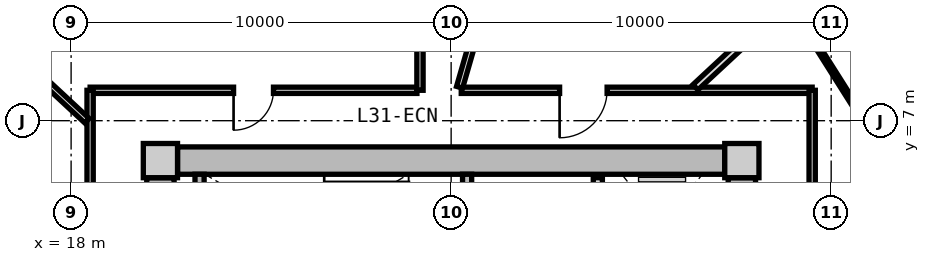
"""IFC4 building model, lengths in metres.
Left out: names, types, materials, properties, quantities, classifications, styles, units other than length and angle.
Written with IfcOpenShell. Run it as: python <this file> out.ifc"""

import sys

from ifc_helpers import new_model, si_unit, direction, frame, frame_2d, origin, origin_2d, place, context, subcontext, project, spatial, rectangle, extrude, source, transform, mapped, element, fill, save


model = new_model("IFC4")
c1 = context("Model", 3, precision=1e-05, world=origin(), true_north=direction((0.0, 1.0)))
c2 = subcontext(c1, "Body", "Model", "MODEL_VIEW")
j1 = project(units=[si_unit("LENGTHUNIT", "METRE"), si_unit("PLANEANGLEUNIT", "RADIAN")], contexts=[c1])
p1 = place(None, origin())
s1 = spatial("IfcSite", under=j1, at=p1, CompositionType="ELEMENT")
p2 = place(p1, origin())
s2 = spatial("IfcBuilding", under=s1, at=p2, CompositionType="ELEMENT")
p3 = place(p2, frame((0.0, 0.0, 102.35)))
s3 = spatial("IfcBuildingStorey", under=s2, at=p3, CompositionType="ELEMENT", Elevation=102.35)
m1 = source(origin(), c2, "Body", "SweptSolid", [
    extrude(rectangle(XDim=0.9, YDim=0.9, at=origin_2d()), origin(), (0.0, 0.0, 1.0), 3.05),
])
for number, where, z_axis, x_axis in (
    (1, (35.65, 5.95, 0.0), (0.0, 0.0, 1.0), (1.0, 0.0, 0.0)),
    (2, (20.35, 5.95, 0.0), (0.0, 0.0, 1.0), (1.0, 0.0, 0.0)),
):
    element("IfcColumn", number, at=place(p3, frame(where, z_axis=z_axis, x_axis=x_axis)), inside=s3, PredefinedType="COLUMN", context=c2, shape_type="MappedRepresentation", body=[
        mapped(m1, transform((0.0, 0.0, 0.0), x_axis=(1.0, 0.0, 0.0), y_axis=(0.0, 1.0, 0.0), z_axis=(0.0, 0.0, 1.0), scale=1.0)),
    ])
m2 = source(origin(), c2, "Body", "SweptSolid", [
    extrude(rectangle(XDim=14.4, YDim=0.72, at=frame_2d((7.2, 0.0))), origin(), (0.0, 0.0, 1.0), 2.79),
])
p4 = place(p3, frame((20.8, 5.95, 0.0), z_axis=(0.0, 0.0, 1.0), x_axis=(1.0, 0.0, 0.0)))
e3 = element("IfcWall", 3, at=p4, inside=s3, PredefinedType="SHEAR", context=c2, shape_type="MappedRepresentation", body=[
    mapped(m2, transform((0.0, 0.0, 0.0), x_axis=(1.0, 0.0, 0.0), y_axis=(0.0, 1.0, 0.0), z_axis=(0.0, 0.0, 1.0), scale=1.0)),
])
m3 = source(origin(), c2, "Body", "SweptSolid", [
    extrude(rectangle(XDim=11.0, YDim=0.72, at=frame_2d((5.5, 0.0))), origin(), (0.0, 0.0, 1.0), 2.79),
])
p5 = place(p3, frame((20.35, -5.5, 0.0), z_axis=(0.0, 0.0, 1.0), x_axis=(0.0, 1.0, 0.0)))
e4 = element("IfcWall", 4, at=p5, inside=s3, PredefinedType="SHEAR", context=c2, shape_type="MappedRepresentation", body=[
    mapped(m3, transform((0.0, 0.0, 0.0), x_axis=(1.0, 0.0, 0.0), y_axis=(0.0, 1.0, 0.0), z_axis=(0.0, 0.0, 1.0), scale=1.0)),
])
p6 = place(p5, frame((3.8, 0.0, 0.0)))
e5 = element("IfcOpeningElement", 5, at=p6, cuts=e4, PredefinedType="OPENING", context=c2, shape_type="SweptSolid", body=[
    extrude(rectangle(XDim=1.2, YDim=2.15, at=frame_2d((0.6, 1.075))), frame((0.0, 0.37, 0.0), z_axis=(0.0, -1.0, 0.0), x_axis=(1.0, 0.0, 0.0)), (0.0, 0.0, 1.0), 0.74),
])
p7 = place(p3, frame((35.65, 5.5, 0.0), z_axis=(0.0, 0.0, 1.0), x_axis=(0.0, -1.0, 0.0)))
e6 = element("IfcWall", 6, at=p7, inside=s3, PredefinedType="SHEAR", context=c2, shape_type="MappedRepresentation", body=[
    mapped(m3, transform((0.0, 0.0, 0.0), x_axis=(1.0, 0.0, 0.0), y_axis=(0.0, 1.0, 0.0), z_axis=(0.0, 0.0, 1.0), scale=1.0)),
])
p8 = place(p7, frame((5.65, 0.0, 0.0)))
e7 = element("IfcOpeningElement", 7, at=p8, cuts=e6, PredefinedType="OPENING", context=c2, shape_type="SweptSolid", body=[
    extrude(rectangle(XDim=1.2, YDim=2.15, at=frame_2d((0.6, 1.075))), frame((0.0, 0.37, 0.0), z_axis=(0.0, -1.0, 0.0), x_axis=(1.0, 0.0, 0.0)), (0.0, 0.0, 1.0), 0.74),
])
m4 = source(origin(), c2, "Body", "SweptSolid", [
    extrude(rectangle(XDim=3.14, YDim=0.24, at=frame_2d((1.57, 0.0))), origin(), (0.0, 0.0, 1.0), 2.79),
])
p9 = place(p3, frame((21.38, 2.45, 0.0), z_axis=(0.0, 0.0, 1.0), x_axis=(0.0, 1.0, 0.0)))
e8 = element("IfcWall", 8, at=p9, inside=s3, PredefinedType="PARTITIONING", context=c2, shape_type="MappedRepresentation", body=[
    mapped(m4, transform((0.0, 0.0, 0.0), x_axis=(1.0, 0.0, 0.0), y_axis=(0.0, 1.0, 0.0), z_axis=(0.0, 0.0, 1.0), scale=1.0)),
])
p10 = place(p3, frame((28.42, 2.45, 0.0), z_axis=(0.0, 0.0, 1.0), x_axis=(0.0, 1.0, 0.0)))
e9 = element("IfcWall", 9, at=p10, inside=s3, PredefinedType="PARTITIONING", context=c2, shape_type="MappedRepresentation", body=[
    mapped(m4, transform((0.0, 0.0, 0.0), x_axis=(1.0, 0.0, 0.0), y_axis=(0.0, 1.0, 0.0), z_axis=(0.0, 0.0, 1.0), scale=1.0)),
])
p11 = place(p10, frame((0.55, 0.0, 0.0)))
e10 = element("IfcOpeningElement", 10, at=p11, cuts=e9, PredefinedType="OPENING", context=c2, shape_type="SweptSolid", body=[
    extrude(rectangle(XDim=1.1, YDim=2.15, at=frame_2d((0.55, 1.075))), frame((0.0, 0.13, 0.0), z_axis=(0.0, -1.0, 0.0), x_axis=(1.0, 0.0, 0.0)), (0.0, 0.0, 1.0), 0.26),
])
m5 = source(origin(), c2, "Body", "SweptSolid", [
    extrude(rectangle(XDim=5.0, YDim=0.24, at=frame_2d((2.5, 0.0))), origin(), (0.0, 0.0, 1.0), 2.775),
])
p12 = place(p3, frame((31.86, 0.5, 0.0), z_axis=(0.0, 0.0, 1.0), x_axis=(0.0, 1.0, 0.0)))
e11 = element("IfcWall", 11, at=p12, inside=s3, PredefinedType="PARTITIONING", context=c2, shape_type="MappedRepresentation", body=[
    mapped(m5, transform((0.0, 0.0, 0.0), x_axis=(1.0, 0.0, 0.0), y_axis=(0.0, 1.0, 0.0), z_axis=(0.0, 0.0, 1.0), scale=1.0)),
])
p13 = place(p12, frame((3.05, 0.0, 0.0)))
e12 = element("IfcOpeningElement", 12, at=p13, cuts=e11, PredefinedType="OPENING", context=c2, shape_type="SweptSolid", body=[
    extrude(rectangle(XDim=1.3, YDim=2.2, at=frame_2d((0.65, 1.1))), frame((0.0, 0.13, 0.0), z_axis=(0.0, -1.0, 0.0), x_axis=(1.0, 0.0, 0.0)), (0.0, 0.0, 1.0), 0.26),
])
p14 = place(p12, frame((0.55, 0.0, 0.0)))
e13 = element("IfcOpeningElement", 13, at=p14, cuts=e11, PredefinedType="OPENING", context=c2, shape_type="SweptSolid", body=[
    extrude(rectangle(XDim=1.3, YDim=2.2, at=frame_2d((0.65, 1.1))), frame((0.0, 0.13, 0.0), z_axis=(0.0, -1.0, 0.0), x_axis=(1.0, 0.0, 0.0)), (0.0, 0.0, 1.0), 0.26),
])
m6 = source(origin(), c2, "Body", "SweptSolid", [
    extrude(rectangle(XDim=8.6, YDim=0.165, at=frame_2d((4.3, 0.0))), origin(), (0.0, 0.0, 1.0), 2.775),
])
p15 = place(p3, frame((18.5, 7.8, 0.0), z_axis=(0.0, 0.0, 1.0), x_axis=(1.0, 0.0, 0.0)))
e14 = element("IfcWall", 14, at=p15, inside=s3, PredefinedType="PARTITIONING", context=c2, shape_type="MappedRepresentation", body=[
    mapped(m6, transform((0.0, 0.0, 0.0), x_axis=(1.0, 0.0, 0.0), y_axis=(0.0, 1.0, 0.0), z_axis=(0.0, 0.0, 1.0), scale=1.0)),
])
p16 = place(p15, frame((3.775, 0.0, 0.0)))
e15 = element("IfcOpeningElement", 15, at=p16, cuts=e14, PredefinedType="OPENING", context=c2, shape_type="SweptSolid", body=[
    extrude(rectangle(XDim=1.05, YDim=2.15, at=frame_2d((0.525, 1.075))), frame((0.0, 0.093, 0.0), z_axis=(0.0, -1.0, 0.0), x_axis=(1.0, 0.0, 0.0)), (0.0, 0.0, 1.0), 0.185),
])
m7 = source(origin(), c2, "Body", "SweptSolid", [
    extrude(rectangle(XDim=9.234, YDim=0.165, at=frame_2d((4.617, 0.0))), origin(), (0.0, 0.0, 1.0), 2.775),
])
p17 = place(p3, frame((28.266, 7.8, 0.0), z_axis=(0.0, 0.0, 1.0), x_axis=(1.0, 0.0, 0.0)))
e16 = element("IfcWall", 16, at=p17, inside=s3, PredefinedType="PARTITIONING", context=c2, shape_type="MappedRepresentation", body=[
    mapped(m7, transform((0.0, 0.0, 0.0), x_axis=(1.0, 0.0, 0.0), y_axis=(0.0, 1.0, 0.0), z_axis=(0.0, 0.0, 1.0), scale=1.0)),
])
p18 = place(p17, frame((2.588, 0.0, 0.0)))
e17 = element("IfcOpeningElement", 17, at=p18, cuts=e16, PredefinedType="OPENING", context=c2, shape_type="SweptSolid", body=[
    extrude(rectangle(XDim=1.25, YDim=2.2, at=frame_2d((0.625, 1.1))), frame((0.0, 0.093, 0.0), z_axis=(0.0, -1.0, 0.0), x_axis=(1.0, 0.0, 0.0)), (0.0, 0.0, 1.0), 0.185),
])
m8 = source(origin(), c2, "Body", "SweptSolid", [
    extrude(rectangle(XDim=15.6, YDim=0.165, at=frame_2d((7.8, 0.0))), origin(), (0.0, 0.0, 1.0), 2.775),
])
p19 = place(p3, frame((18.5, -7.8, 0.0), z_axis=(0.0, 0.0, 1.0), x_axis=(0.0, 1.0, 0.0)))
e18 = element("IfcWall", 18, at=p19, inside=s3, PredefinedType="PARTITIONING", context=c2, shape_type="MappedRepresentation", body=[
    mapped(m8, transform((0.0, 0.0, 0.0), x_axis=(1.0, 0.0, 0.0), y_axis=(0.0, 1.0, 0.0), z_axis=(0.0, 0.0, 1.0), scale=1.0)),
])
p20 = place(p19, frame((10.383, 0.0, 0.0)))
e19 = element("IfcOpeningElement", 19, at=p20, cuts=e18, PredefinedType="OPENING", context=c2, shape_type="SweptSolid", body=[
    extrude(rectangle(XDim=1.05, YDim=2.15, at=frame_2d((0.525, 1.075))), frame((0.0, 0.093, 0.0), z_axis=(0.0, -1.0, 0.0), x_axis=(1.0, 0.0, 0.0)), (0.0, 0.0, 1.0), 0.185),
])
p21 = place(p19, frame((6.419, 0.0, 0.0)))
e20 = element("IfcOpeningElement", 20, at=p21, cuts=e18, PredefinedType="OPENING", context=c2, shape_type="SweptSolid", body=[
    extrude(rectangle(XDim=1.05, YDim=2.15, at=frame_2d((0.525, 1.075))), frame((0.0, 0.093, 0.0), z_axis=(0.0, -1.0, 0.0), x_axis=(1.0, 0.0, 0.0)), (0.0, 0.0, 1.0), 0.185),
])
p22 = place(p19, frame((1.821, 0.0, 0.0)))
e21 = element("IfcOpeningElement", 21, at=p22, cuts=e18, PredefinedType="OPENING", context=c2, shape_type="SweptSolid", body=[
    extrude(rectangle(XDim=1.05, YDim=2.15, at=frame_2d((0.525, 1.075))), frame((0.0, 0.093, 0.0), z_axis=(0.0, -1.0, 0.0), x_axis=(1.0, 0.0, 0.0)), (0.0, 0.0, 1.0), 0.185),
])
p23 = place(p3, frame((37.5, 7.8, 0.0), z_axis=(0.0, 0.0, 1.0), x_axis=(0.0, -1.0, 0.0)))
e22 = element("IfcWall", 22, at=p23, inside=s3, PredefinedType="PARTITIONING", context=c2, shape_type="MappedRepresentation", body=[
    mapped(m8, transform((0.0, 0.0, 0.0), x_axis=(1.0, 0.0, 0.0), y_axis=(0.0, 1.0, 0.0), z_axis=(0.0, 0.0, 1.0), scale=1.0)),
])
p24 = place(p23, frame((6.87, 0.0, 0.0)))
e23 = element("IfcOpeningElement", 23, at=p24, cuts=e22, PredefinedType="OPENING", context=c2, shape_type="SweptSolid", body=[
    extrude(rectangle(XDim=1.05, YDim=2.15, at=frame_2d((0.525, 1.075))), frame((0.0, 0.093, 0.0), z_axis=(0.0, -1.0, 0.0), x_axis=(1.0, 0.0, 0.0)), (0.0, 0.0, 1.0), 0.185),
])
m9 = source(origin(), c2, "Body", "SweptSolid", [
    extrude(rectangle(XDim=8.989, YDim=0.165, at=frame_2d((4.495, 0.0))), origin(), (0.0, 0.0, 1.0), 2.275),
])
p25 = place(p3, frame((28.222, 7.88, 0.0), z_axis=(0.0, 0.0, 1.0), x_axis=(0.27702323008, 0.960863221274, 0.0)))
e24 = element("IfcWall", 24, at=p25, inside=s3, PredefinedType="PARTITIONING", context=c2, shape_type="MappedRepresentation", body=[
    mapped(m9, transform((0.0, 0.0, 0.0), x_axis=(1.0, 0.0, 0.0), y_axis=(0.0, 1.0, 0.0), z_axis=(0.0, 0.0, 1.0), scale=1.0)),
])
m10 = source(origin(), c2, "Body", "SweptSolid", [
    extrude(rectangle(XDim=7.482, YDim=0.165, at=frame_2d((3.741, 0.0))), origin(), (0.0, 0.0, 1.0), 2.275),
])
p26 = place(p3, frame((18.42, 6.998, 0.0), z_axis=(0.0, 0.0, 1.0), x_axis=(-0.732508698043, 0.680757671489, 0.0)))
e25 = element("IfcWall", 25, at=p26, inside=s3, PredefinedType="PARTITIONING", context=c2, shape_type="MappedRepresentation", body=[
    mapped(m10, transform((0.0, 0.0, 0.0), x_axis=(1.0, 0.0, 0.0), y_axis=(0.0, 1.0, 0.0), z_axis=(0.0, 0.0, 1.0), scale=1.0)),
])
m11 = source(origin(), c2, "Body", "SweptSolid", [
    extrude(rectangle(XDim=7.56, YDim=0.165, at=frame_2d((3.78, 0.0))), origin(), (0.0, 0.0, 1.0), 2.775),
])
p27 = place(p3, frame((27.18, 7.8, 0.0), z_axis=(0.0, 0.0, 1.0), x_axis=(0.0, 1.0, 0.0)))
e26 = element("IfcWall", 26, at=p27, inside=s3, PredefinedType="PARTITIONING", context=c2, shape_type="MappedRepresentation", body=[
    mapped(m11, transform((0.0, 0.0, 0.0), x_axis=(1.0, 0.0, 0.0), y_axis=(0.0, 1.0, 0.0), z_axis=(0.0, 0.0, 1.0), scale=1.0)),
])
m12 = source(origin(), c2, "Body", "SweptSolid", [
    extrude(rectangle(XDim=4.735, YDim=0.14, at=frame_2d((2.368, 0.0))), origin(), (0.0, 0.0, 1.0), 2.775),
])
p28 = place(p3, frame((18.47, 4.368, 0.0), z_axis=(0.0, 0.0, 1.0), x_axis=(-0.863537576642, 0.504284496814, 0.0)))
e27 = element("IfcWall", 27, at=p28, inside=s3, PredefinedType="PARTITIONING", context=c2, shape_type="MappedRepresentation", body=[
    mapped(m12, transform((0.0, 0.0, 0.0), x_axis=(1.0, 0.0, 0.0), y_axis=(0.0, 1.0, 0.0), z_axis=(0.0, 0.0, 1.0), scale=1.0)),
])
p29 = place(p28, frame((1.908, 0.0, 0.0)))
e28 = element("IfcOpeningElement", 28, at=p29, cuts=e27, PredefinedType="OPENING", context=c2, shape_type="SweptSolid", body=[
    extrude(rectangle(XDim=0.92, YDim=2.1, at=frame_2d((0.46, 1.05))), frame((0.0, 0.08, 0.0), z_axis=(0.0, -1.0, 0.0), x_axis=(1.0, 0.0, 0.0)), (0.0, 0.0, 1.0), 0.16),
])
m13 = source(origin(), c2, "Body", "SweptSolid", [
    extrude(rectangle(XDim=6.187, YDim=0.19, at=frame_2d((3.093, 0.0))), origin(), (0.0, 0.0, 1.0), 2.275),
])
p30 = place(p3, frame((34.429, 7.88, 0.0), z_axis=(0.0, 0.0, 1.0), x_axis=(0.732501077882, 0.680765870841, 0.0)))
e29 = element("IfcWall", 29, at=p30, inside=s3, PredefinedType="PARTITIONING", context=c2, shape_type="MappedRepresentation", body=[
    mapped(m13, transform((0.0, 0.0, 0.0), x_axis=(1.0, 0.0, 0.0), y_axis=(0.0, 1.0, 0.0), z_axis=(0.0, 0.0, 1.0), scale=1.0)),
])
m14 = source(origin(), c2, "Body", "SweptSolid", [
    extrude(rectangle(XDim=7.618, YDim=0.115, at=frame_2d((3.809, 0.0))), origin(), (0.0, 0.0, 1.0), 2.775),
])
p31 = place(p3, frame((40.923, 3.749, 0.0), z_axis=(0.0, 0.0, 1.0), x_axis=(-0.534316104929, 0.845284744931, 0.0)))
e30 = element("IfcWall", 30, at=p31, inside=s3, PredefinedType="PARTITIONING", context=c2, shape_type="MappedRepresentation", body=[
    mapped(m14, transform((0.0, 0.0, 0.0), x_axis=(1.0, 0.0, 0.0), y_axis=(0.0, 1.0, 0.0), z_axis=(0.0, 0.0, 1.0), scale=1.0)),
])
p32 = place(p31, frame((3.334, 0.0, 0.0)))
e31 = element("IfcOpeningElement", 31, at=p32, cuts=e30, PredefinedType="OPENING", context=c2, shape_type="SweptSolid", body=[
    extrude(rectangle(XDim=0.95, YDim=2.1, at=frame_2d((0.475, 1.05))), frame((0.0, 0.067, 0.0), z_axis=(0.0, -1.0, 0.0), x_axis=(1.0, 0.0, 0.0)), (0.0, 0.0, 1.0), 0.135),
])
m15 = source(origin(), c2, "Body", "SweptSolid", [
    extrude(rectangle(XDim=1.05, YDim=2.15, at=frame_2d((0.525, 1.075))), frame((0.0, 0.025, 0.0), z_axis=(0.0, -1.0, 0.0), x_axis=(1.0, 0.0, 0.0)), (0.0, 0.0, 1.0), 0.05),
])
p33 = place(p16, frame((1.05, 0.0, 0.0), z_axis=(0.0, 0.0, 1.0), x_axis=(-1.0, 0.0, 0.0)))
e32 = element("IfcDoor", 32, at=p33, inside=s3, OperationType="SINGLE_SWING_RIGHT", PredefinedType="DOOR", context=c2, shape_type="MappedRepresentation", body=[
    mapped(m15, transform((0.0, 0.0, 0.0), x_axis=(1.0, 0.0, 0.0), y_axis=(0.0, 1.0, 0.0), z_axis=(0.0, 0.0, 1.0), scale=1.0)),
])
fill(e15, e32)
m16 = source(origin(), c2, "Body", "SweptSolid", [
    extrude(rectangle(XDim=1.25, YDim=2.2, at=frame_2d((0.625, 1.1))), frame((0.0, 0.025, 0.0), z_axis=(0.0, -1.0, 0.0), x_axis=(1.0, 0.0, 0.0)), (0.0, 0.0, 1.0), 0.05),
])
p34 = place(p18, frame((1.25, 0.0, 0.0), z_axis=(0.0, 0.0, 1.0), x_axis=(-1.0, 0.0, 0.0)))
e33 = element("IfcDoor", 33, at=p34, inside=s3, OperationType="SINGLE_SWING_RIGHT", PredefinedType="DOOR", context=c2, shape_type="MappedRepresentation", body=[
    mapped(m16, transform((0.0, 0.0, 0.0), x_axis=(1.0, 0.0, 0.0), y_axis=(0.0, 1.0, 0.0), z_axis=(0.0, 0.0, 1.0), scale=1.0)),
])
fill(e17, e33)
save(model, sys.argv[1])
